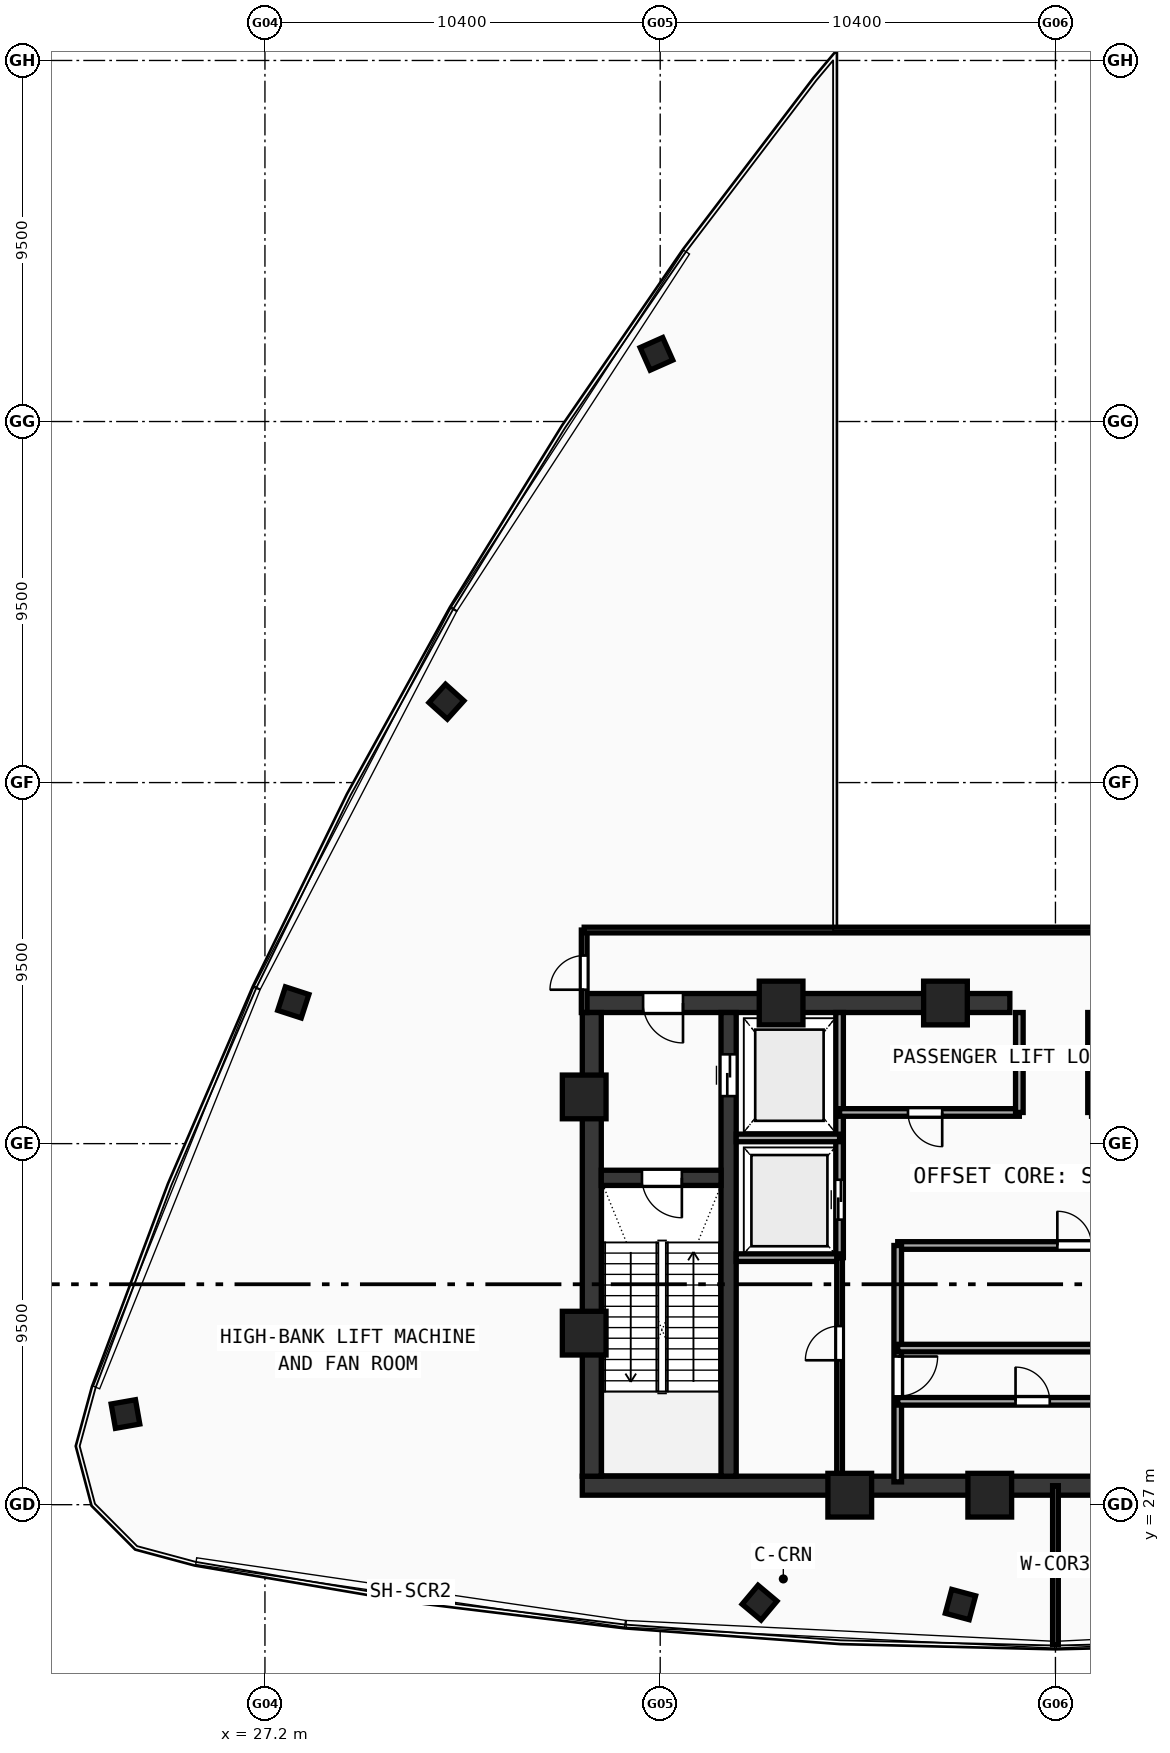
"""IFC4 building model, lengths in metres.
Left out: names, types, materials, properties, quantities, classifications, styles, units other than length and angle.
Written with IfcOpenShell. Run it as: python <this file> out.ifc"""

import sys

from ifc_helpers import new_model, si_unit, direction, frame, frame_2d, origin, origin_with_axes, origin_2d, place, context, subcontext, project, spatial, rectangle, hollow_rectangle, extrude, source, transform, mapped, element, fill, save


model = new_model("IFC4")
c1 = context("Model", 3, precision=1e-05, world=origin(), true_north=direction((0.0, 1.0)))
c2 = subcontext(c1, "Body", "Model", "MODEL_VIEW")
j1 = project(units=[si_unit("LENGTHUNIT", "METRE"), si_unit("PLANEANGLEUNIT", "RADIAN")], contexts=[c1])
p1 = place(None, origin())
s1 = spatial("IfcSite", under=j1, at=p1, CompositionType="ELEMENT")
p2 = place(p1, origin())
s2 = spatial("IfcBuilding", under=s1, at=p2, CompositionType="ELEMENT")
p3 = place(p2, frame((0.0, 0.0, 381.76)))
s3 = spatial("IfcBuildingStorey", under=s2, at=p3, CompositionType="ELEMENT", Elevation=381.76)
p4 = place(p3, frame((35.55, 27.5, 0.0), z_axis=(0.0, 0.0, 1.0), x_axis=(1.0, 0.0, 0.0)))
e1 = element("IfcWall", 1, at=p4, inside=s3, PredefinedType="SHEAR", context=c2, shape_type="SweptSolid", body=[
    extrude(rectangle(XDim=24.9, YDim=0.5, at=frame_2d((12.45, 0.0))), origin(), (0.0, 0.0, 1.0), 4.72),
])
p5 = place(p3, frame((35.55, 40.2, 0.0), z_axis=(0.0, 0.0, 1.0), x_axis=(1.0, 0.0, 0.0)))
e2 = element("IfcWall", 2, at=p5, inside=s3, PredefinedType="SHEAR", context=c2, shape_type="SweptSolid", body=[
    extrude(rectangle(XDim=11.25, YDim=0.5, at=frame_2d((5.625, 0.0))), origin(), (0.0, 0.0, 1.0), 4.72),
])
p6 = place(p5, frame((1.6, 0.0, 0.0)))
e3 = element("IfcOpeningElement", 3, at=p6, cuts=e2, PredefinedType="OPENING", context=c2, shape_type="SweptSolid", body=[
    extrude(rectangle(XDim=1.05, YDim=2.1, at=frame_2d((0.525, 1.05))), frame((0.0, 0.26, 0.0), z_axis=(0.0, -1.0, 0.0), x_axis=(1.0, 0.0, 0.0)), (0.0, 0.0, 1.0), 0.52),
])
p7 = place(p3, frame((35.8, 27.75, 0.0), z_axis=(0.0, 0.0, 1.0), x_axis=(0.0, 1.0, 0.0)))
e4 = element("IfcWall", 4, at=p7, inside=s3, PredefinedType="SHEAR", context=c2, shape_type="SweptSolid", body=[
    extrude(rectangle(XDim=12.2, YDim=0.5, at=frame_2d((6.1, 0.0))), origin(), (0.0, 0.0, 1.0), 4.72),
])
p8 = place(p3, frame((39.4, 27.75, 0.0), z_axis=(0.0, 0.0, 1.0), x_axis=(0.0, 1.0, 0.0)))
e5 = element("IfcWall", 5, at=p8, inside=s3, PredefinedType="SHEAR", context=c2, shape_type="SweptSolid", body=[
    extrude(rectangle(XDim=12.2, YDim=0.4, at=frame_2d((6.1, 0.0))), origin(), (0.0, 0.0, 1.0), 4.72),
])
p9 = place(p8, frame((10.0, 0.0, 0.0)))
e6 = element("IfcOpeningElement", 6, at=p9, cuts=e5, PredefinedType="OPENING", context=c2, shape_type="SweptSolid", body=[
    extrude(rectangle(XDim=1.1, YDim=2.1, at=frame_2d((0.55, 1.05))), frame((0.0, 0.21, 0.0), z_axis=(0.0, -1.0, 0.0), x_axis=(1.0, 0.0, 0.0)), (0.0, 0.0, 1.0), 0.42),
])
p10 = place(p3, frame((36.05, 35.6, 0.0), z_axis=(0.0, 0.0, 1.0), x_axis=(1.0, 0.0, 0.0)))
e7 = element("IfcWall", 7, at=p10, inside=s3, PredefinedType="SHEAR", context=c2, shape_type="SweptSolid", body=[
    extrude(rectangle(XDim=3.15, YDim=0.4, at=frame_2d((1.575, 0.0))), origin(), (0.0, 0.0, 1.0), 4.72),
])
p11 = place(p10, frame((1.07, 0.0, 0.0)))
e8 = element("IfcOpeningElement", 8, at=p11, cuts=e7, PredefinedType="OPENING", context=c2, shape_type="SweptSolid", body=[
    extrude(rectangle(XDim=1.05, YDim=2.1, at=frame_2d((0.525, 1.05))), frame((0.0, 0.21, 0.0), z_axis=(0.0, -1.0, 0.0), x_axis=(1.0, 0.0, 0.0)), (0.0, 0.0, 1.0), 0.42),
])
m1 = source(origin(), c2, "Body", "SweptSolid", [
    extrude(hollow_rectangle(XDim=1.15, YDim=1.15, WallThickness=0.048, at=origin_2d()), origin(), (0.0, 0.0, 1.0), 5.0),
])
for number, where, z_axis, x_axis in (
    (9, (42.588, 27.25, -0.28), (0.0, 0.0, 1.0), (1.0, 0.0, 0.0)),
    (10, (46.272, 27.25, -0.28), (0.0, 0.0, 1.0), (1.0, 0.0, 0.0)),
    (11, (45.106, 40.2, -0.28), (0.0, 0.0, 1.0), (1.0, 0.0, 0.0)),
    (12, (40.781, 40.2, -0.28), (0.0, 0.0, 1.0), (1.0, 0.0, 0.0)),
    (13, (35.6, 37.729, -0.28), (0.0, 0.0, 1.0), (1.0, 0.0, 0.0)),
    (14, (35.6, 31.513, -0.28), (0.0, 0.0, 1.0), (1.0, 0.0, 0.0)),
):
    element("IfcColumn", number, at=place(p3, frame(where, z_axis=z_axis, x_axis=x_axis)), inside=s3, PredefinedType="COLUMN", context=c2, shape_type="MappedRepresentation", body=[
        mapped(m1, transform((0.0, 0.0, 0.0), scale=1.0)),
    ])
m2 = source(origin(), c2, "Body", "SweptSolid", [
    extrude(hollow_rectangle(XDim=0.65, YDim=0.65, WallThickness=0.024, at=origin_2d()), origin(), (0.0, 0.0, 1.0), 5.0),
])
for number, where, z_axis, x_axis in (
    (15, (40.215, 24.422, -0.28), (0.0, 0.0, 1.0), (0.766, -0.643, 0.0)),
    (16, (45.501, 24.373, -0.28), (0.0, 0.0, 1.0), (0.966, -0.259, 0.0)),
    (17, (37.501, 57.281, -0.28), (0.0, 0.0, 1.0), (-0.914, -0.407, 0.0)),
    (18, (31.975, 48.129, -0.28), (0.0, 0.0, 1.0), (-0.669, -0.743, 0.0)),
    (19, (27.947, 40.216, -0.28), (0.0, 0.0, 1.0), (-0.309, -0.951, 0.0)),
    (20, (23.53, 29.385, -0.28), (0.0, 0.0, 1.0), (0.174, -0.985, 0.0)),
):
    element("IfcColumn", number, at=place(p3, frame(where, z_axis=z_axis, x_axis=x_axis)), inside=s3, PredefinedType="COLUMN", context=c2, shape_type="MappedRepresentation", body=[
        mapped(m2, transform((0.0, 0.0, 0.0), scale=1.0)),
    ])
p12 = place(p3, frame((42.32, 33.5, 0.0), z_axis=(0.0, 0.0, 1.0), x_axis=(0.0, 1.0, 0.0)))
e21 = element("IfcWall", 21, at=p12, inside=s3, PredefinedType="SOLIDWALL", context=c2, shape_type="SweptSolid", body=[
    extrude(rectangle(XDim=6.45, YDim=0.2, at=frame_2d((3.225, 0.0))), origin(), (0.0, 0.0, 1.0), 4.72),
])
p13 = place(p12, frame((1.0, 0.0, 0.0)))
e22 = element("IfcOpeningElement", 22, at=p13, cuts=e21, PredefinedType="OPENING", context=c2, shape_type="SweptSolid", body=[
    extrude(rectangle(XDim=1.05, YDim=2.1, at=frame_2d((0.525, 1.05))), frame((0.0, 0.11, 0.0), z_axis=(0.0, -1.0, 0.0), x_axis=(1.0, 0.0, 0.0)), (0.0, 0.0, 1.0), 0.22),
])
for number, where, z_axis, x_axis in (
    (23, (39.6, 36.65, 0.0), (0.0, 0.0, 1.0), (1.0, 0.0, 0.0)),
    (24, (39.6, 33.5, 0.0), (0.0, 0.0, 1.0), (1.0, 0.0, 0.0)),
):
    element("IfcWall", number, at=place(p3, frame(where, z_axis=z_axis, x_axis=x_axis)), inside=s3, PredefinedType="SOLIDWALL", context=c2, shape_type="SweptSolid", body=[
        extrude(rectangle(XDim=2.72, YDim=0.2, at=frame_2d((1.36, 0.0))), origin(), (0.0, 0.0, 1.0), 4.72),
    ])
p14 = place(p3, frame((42.32, 37.32, 0.0), z_axis=(0.0, 0.0, 1.0), x_axis=(1.0, 0.0, 0.0)))
e25 = element("IfcWall", 25, at=p14, inside=s3, PredefinedType="SOLIDWALL", context=c2, shape_type="SweptSolid", body=[
    extrude(rectangle(XDim=4.73, YDim=0.2, at=frame_2d((2.365, 0.0))), origin(), (0.0, 0.0, 1.0), 4.72),
])
p15 = place(p14, frame((1.8, 0.0, 0.0)))
e26 = element("IfcOpeningElement", 26, at=p15, cuts=e25, PredefinedType="OPENING", context=c2, shape_type="SweptSolid", body=[
    extrude(rectangle(XDim=0.9, YDim=2.1, at=frame_2d((0.45, 1.05))), frame((0.0, 0.11, 0.0), z_axis=(0.0, -1.0, 0.0), x_axis=(1.0, 0.0, 0.0)), (0.0, 0.0, 1.0), 0.22),
])
for number, where, z_axis, x_axis in (
    (27, (47.05, 37.32, 0.0), (0.0, 0.0, 1.0), (0.0, 1.0, 0.0)),
    (28, (48.95, 37.32, 0.0), (0.0, 0.0, 1.0), (0.0, 1.0, 0.0)),
):
    element("IfcWall", number, at=place(p3, frame(where, z_axis=z_axis, x_axis=x_axis)), inside=s3, PredefinedType="SOLIDWALL", context=c2, shape_type="SweptSolid", body=[
        extrude(rectangle(XDim=2.63, YDim=0.2, at=frame_2d((1.315, 0.0))), origin(), (0.0, 0.0, 1.0), 4.72),
    ])
p16 = place(p3, frame((43.85, 33.82, 0.0), z_axis=(0.0, 0.0, 1.0), x_axis=(1.0, 0.0, 0.0)))
e29 = element("IfcWall", 29, at=p16, inside=s3, PredefinedType="SOLIDWALL", context=c2, shape_type="SweptSolid", body=[
    extrude(rectangle(XDim=9.83, YDim=0.2, at=frame_2d((4.915, 0.0))), origin(), (0.0, 0.0, 1.0), 4.72),
])
p17 = place(p16, frame((4.2, 0.0, 0.0)))
e30 = element("IfcOpeningElement", 30, at=p17, cuts=e29, PredefinedType="OPENING", context=c2, shape_type="SweptSolid", body=[
    extrude(rectangle(XDim=0.9, YDim=2.1, at=frame_2d((0.45, 1.05))), frame((0.0, 0.11, 0.0), z_axis=(0.0, -1.0, 0.0), x_axis=(1.0, 0.0, 0.0)), (0.0, 0.0, 1.0), 0.22),
])
p18 = place(p3, frame((43.85, 27.6, 0.0), z_axis=(0.0, 0.0, 1.0), x_axis=(0.0, 1.0, 0.0)))
e31 = element("IfcWall", 31, at=p18, inside=s3, PredefinedType="SOLIDWALL", context=c2, shape_type="SweptSolid", body=[
    extrude(rectangle(XDim=6.22, YDim=0.2, at=frame_2d((3.11, 0.0))), origin(), (0.0, 0.0, 1.0), 4.72),
])
p19 = place(p18, frame((2.25, 0.0, 0.0)))
e32 = element("IfcOpeningElement", 32, at=p19, cuts=e31, PredefinedType="OPENING", context=c2, shape_type="SweptSolid", body=[
    extrude(rectangle(XDim=1.05, YDim=2.1, at=frame_2d((0.525, 1.05))), frame((0.0, 0.11, 0.0), z_axis=(0.0, -1.0, 0.0), x_axis=(1.0, 0.0, 0.0)), (0.0, 0.0, 1.0), 0.22),
])
p20 = place(p3, frame((43.85, 29.72, 0.0), z_axis=(0.0, 0.0, 1.0), x_axis=(1.0, 0.0, 0.0)))
e33 = element("IfcWall", 33, at=p20, inside=s3, PredefinedType="SOLIDWALL", context=c2, shape_type="SweptSolid", body=[
    extrude(rectangle(XDim=7.2, YDim=0.2, at=frame_2d((3.6, 0.0))), origin(), (0.0, 0.0, 1.0), 4.72),
])
p21 = place(p20, frame((3.1, 0.0, 0.0)))
e34 = element("IfcOpeningElement", 34, at=p21, cuts=e33, PredefinedType="OPENING", context=c2, shape_type="SweptSolid", body=[
    extrude(rectangle(XDim=0.9, YDim=2.1, at=frame_2d((0.45, 1.05))), frame((0.0, 0.11, 0.0), z_axis=(0.0, -1.0, 0.0), x_axis=(1.0, 0.0, 0.0)), (0.0, 0.0, 1.0), 0.22),
])
p22 = place(p3, frame((43.85, 31.12, 0.0), z_axis=(0.0, 0.0, 1.0), x_axis=(1.0, 0.0, 0.0)))
e35 = element("IfcWall", 35, at=p22, inside=s3, PredefinedType="SOLIDWALL", context=c2, shape_type="SweptSolid", body=[
    extrude(rectangle(XDim=9.83, YDim=0.2, at=frame_2d((4.915, 0.0))), origin(), (0.0, 0.0, 1.0), 4.72),
])
p23 = place(p3, frame((42.32, 27.6, 0.0), z_axis=(0.0, 0.0, 1.0), x_axis=(0.0, 1.0, 0.0)))
e36 = element("IfcWall", 36, at=p23, inside=s3, PredefinedType="PARTITIONING", context=c2, shape_type="SweptSolid", body=[
    extrude(rectangle(XDim=5.9, YDim=0.15, at=frame_2d((2.95, 0.0))), origin(), (0.0, 0.0, 1.0), 4.72),
])
p24 = place(p23, frame((3.2, 0.0, 0.0)))
e37 = element("IfcOpeningElement", 37, at=p24, cuts=e36, PredefinedType="OPENING", context=c2, shape_type="SweptSolid", body=[
    extrude(rectangle(XDim=0.9, YDim=2.1, at=frame_2d((0.45, 1.05))), frame((0.0, 0.085, 0.0), z_axis=(0.0, -1.0, 0.0), x_axis=(1.0, 0.0, 0.0)), (0.0, 0.0, 1.0), 0.17),
])
p25 = place(p3, frame((35.6, 39.95, 0.0), z_axis=(0.0, 0.0, 1.0), x_axis=(0.0, 1.0, 0.0)))
e38 = element("IfcWall", 38, at=p25, inside=s3, PredefinedType="PARTITIONING", context=c2, shape_type="SweptSolid", body=[
    extrude(rectangle(XDim=2.17, YDim=0.15, at=frame_2d((1.085, 0.0))), origin(), (0.0, 0.0, 1.0), 4.37),
])
p26 = place(p25, frame((0.6, 0.0, 0.0)))
e39 = element("IfcOpeningElement", 39, at=p26, cuts=e38, PredefinedType="OPENING", context=c2, shape_type="SweptSolid", body=[
    extrude(rectangle(XDim=0.9, YDim=2.1, at=frame_2d((0.45, 1.05))), frame((0.0, 0.085, 0.0), z_axis=(0.0, -1.0, 0.0), x_axis=(1.0, 0.0, 0.0)), (0.0, 0.0, 1.0), 0.17),
])
p27 = place(p3, frame((48.0, 23.314, 0.0), z_axis=(0.0, 0.0, 1.0), x_axis=(0.0, 1.0, 0.0)))
e40 = element("IfcWall", 40, at=p27, inside=s3, PredefinedType="PARTITIONING", context=c2, shape_type="SweptSolid", body=[
    extrude(rectangle(XDim=4.186, YDim=0.15, at=frame_2d((2.093, 0.0))), origin(), (0.0, 0.0, 1.0), 4.12),
])
p28 = place(p3, frame((35.6, 42.12, 0.0), z_axis=(0.0, 0.0, 1.0), x_axis=(1.0, 0.0, 0.0)))
e41 = element("IfcWall", 41, at=p28, inside=s3, PredefinedType="PARTITIONING", context=c2, shape_type="SweptSolid", body=[
    extrude(rectangle(XDim=26.65, YDim=0.15, at=frame_2d((13.325, 0.0))), origin(), (0.0, 0.0, 1.0), 4.12),
])
m3 = source(origin(), c2, "Body", "SweptSolid", [
    extrude(rectangle(XDim=1.05, YDim=2.1, at=frame_2d((0.525, 1.05))), frame((0.0, 0.025, 0.0), z_axis=(0.0, -1.0, 0.0), x_axis=(1.0, 0.0, 0.0)), (0.0, 0.0, 1.0), 0.05),
])
p29 = place(p11, frame((1.05, 0.0, 0.0), z_axis=(0.0, 0.0, 1.0), x_axis=(-1.0, 0.0, 0.0)))
e42 = element("IfcDoor", 42, at=p29, inside=s3, OperationType="SINGLE_SWING_LEFT", PredefinedType="DOOR", context=c2, shape_type="MappedRepresentation", body=[
    mapped(m3, transform((0.0, 0.0, 0.0), scale=1.0)),
])
fill(e8, e42)
p30 = place(p6, frame((1.05, 0.0, 0.0), z_axis=(0.0, 0.0, 1.0), x_axis=(-1.0, 0.0, 0.0)))
e43 = element("IfcDoor", 43, at=p30, inside=s3, OperationType="SINGLE_SWING_LEFT", PredefinedType="DOOR", context=c2, shape_type="MappedRepresentation", body=[
    mapped(m3, transform((0.0, 0.0, 0.0), scale=1.0)),
])
fill(e3, e43)
m4 = source(origin(), c2, "Body", "SweptSolid", [
    extrude(rectangle(XDim=1.1, YDim=2.1, at=frame_2d((0.55, 1.05))), frame((0.0, 0.025, 0.0), z_axis=(0.0, -1.0, 0.0), x_axis=(1.0, 0.0, 0.0)), (0.0, 0.0, 1.0), 0.05),
])
p31 = place(p9, frame((1.1, 0.0, 0.0), z_axis=(0.0, 0.0, 1.0), x_axis=(-1.0, 0.0, 0.0)))
e44 = element("IfcDoor", 44, at=p31, inside=s3, OperationType="DOUBLE_DOOR_SLIDING", PredefinedType="DOOR", context=c2, shape_type="MappedRepresentation", body=[
    mapped(m4, transform((0.0, 0.0, 0.0), scale=1.0)),
])
fill(e6, e44)
p32 = place(p13, origin_with_axes())
e45 = element("IfcDoor", 45, at=p32, inside=s3, OperationType="DOUBLE_DOOR_SLIDING", PredefinedType="DOOR", context=c2, shape_type="MappedRepresentation", body=[
    mapped(m3, transform((0.0, 0.0, 0.0), scale=1.0)),
])
fill(e22, e45)
m5 = source(origin(), c2, "Body", "SweptSolid", [
    extrude(rectangle(XDim=0.9, YDim=2.1, at=frame_2d((0.45, 1.05))), frame((0.0, 0.025, 0.0), z_axis=(0.0, -1.0, 0.0), x_axis=(1.0, 0.0, 0.0)), (0.0, 0.0, 1.0), 0.05),
])
p33 = place(p15, frame((0.9, 0.0, 0.0), z_axis=(0.0, 0.0, 1.0), x_axis=(-1.0, 0.0, 0.0)))
e46 = element("IfcDoor", 46, at=p33, inside=s3, OperationType="SINGLE_SWING_LEFT", PredefinedType="DOOR", context=c2, shape_type="MappedRepresentation", body=[
    mapped(m5, transform((0.0, 0.0, 0.0), scale=1.0)),
])
fill(e26, e46)
p34 = place(p17, origin_with_axes())
e47 = element("IfcDoor", 47, at=p34, inside=s3, OperationType="SINGLE_SWING_LEFT", PredefinedType="DOOR", context=c2, shape_type="MappedRepresentation", body=[
    mapped(m5, transform((0.0, 0.0, 0.0), scale=1.0)),
])
fill(e30, e47)
p35 = place(p19, frame((1.05, 0.0, 0.0), z_axis=(0.0, 0.0, 1.0), x_axis=(-1.0, 0.0, 0.0)))
e48 = element("IfcDoor", 48, at=p35, inside=s3, OperationType="SINGLE_SWING_LEFT", PredefinedType="DOOR", context=c2, shape_type="MappedRepresentation", body=[
    mapped(m3, transform((0.0, 0.0, 0.0), scale=1.0)),
])
fill(e32, e48)
p36 = place(p21, origin_with_axes())
e49 = element("IfcDoor", 49, at=p36, inside=s3, OperationType="SINGLE_SWING_LEFT", PredefinedType="DOOR", context=c2, shape_type="MappedRepresentation", body=[
    mapped(m5, transform((0.0, 0.0, 0.0), scale=1.0)),
])
fill(e34, e49)
p37 = place(p24, origin_with_axes())
e50 = element("IfcDoor", 50, at=p37, inside=s3, OperationType="SINGLE_SWING_LEFT", PredefinedType="DOOR", context=c2, shape_type="MappedRepresentation", body=[
    mapped(m5, transform((0.0, 0.0, 0.0), scale=1.0)),
])
fill(e37, e50)
p38 = place(p26, origin_with_axes())
e51 = element("IfcDoor", 51, at=p38, inside=s3, OperationType="SINGLE_SWING_LEFT", PredefinedType="DOOR", context=c2, shape_type="MappedRepresentation", body=[
    mapped(m5, transform((0.0, 0.0, 0.0), scale=1.0)),
])
fill(e39, e51)
save(model, sys.argv[1])
